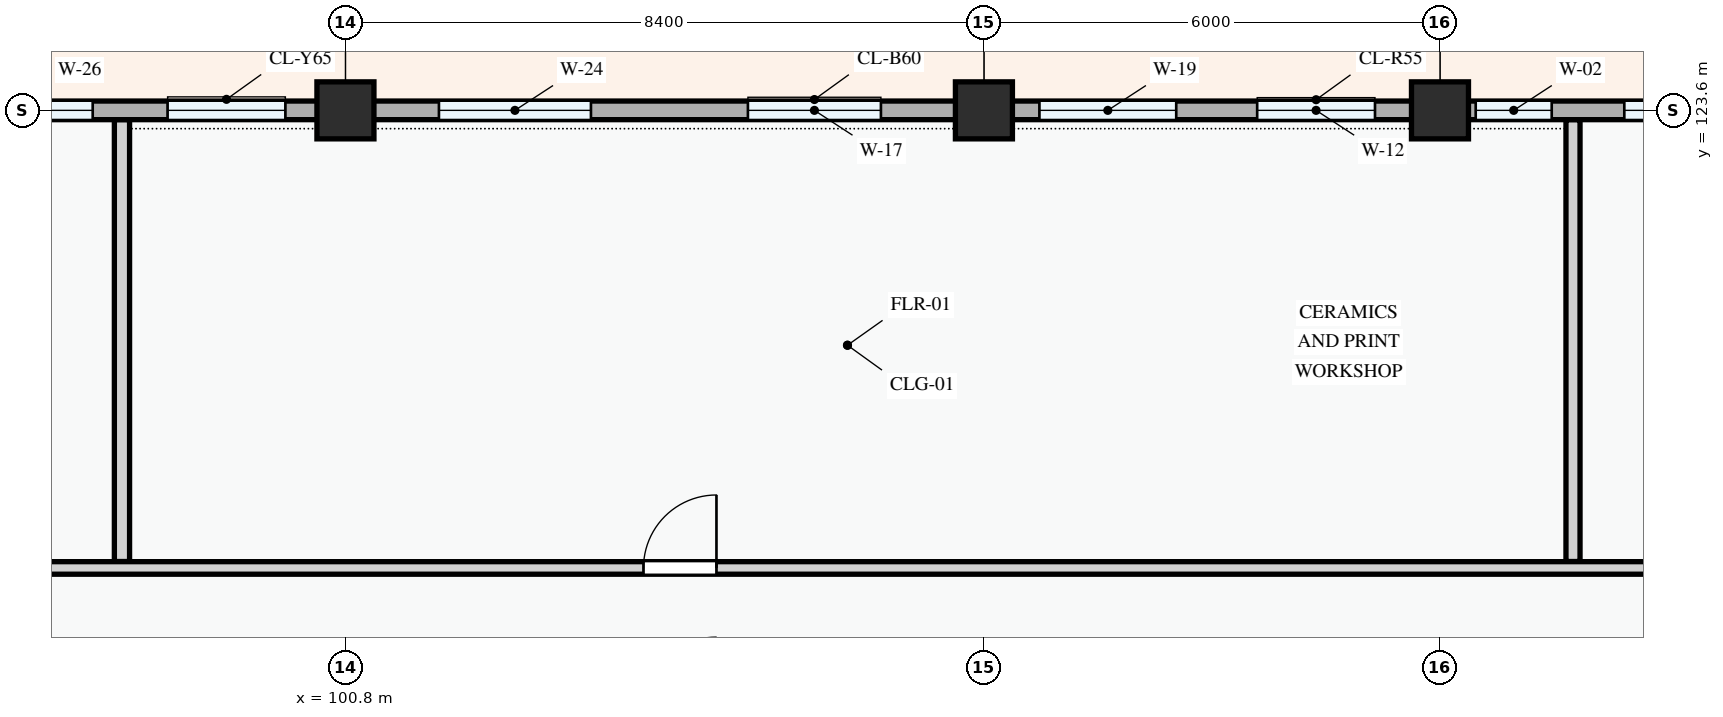
"""IFC4 building model, lengths in metres.
Left out: names, types, materials, properties, quantities, classifications, styles, units other than length and angle.
Written with IfcOpenShell. Run it as: python <this file> out.ifc"""

import sys

from ifc_helpers import new_model, si_unit, direction, frame, frame_2d, origin, origin_2d, place, context, subcontext, project, spatial, rectangle, extrude, element, fill, save


model = new_model("IFC4")
c1 = context("Model", 3, precision=1e-05, world=origin(), true_north=direction((0.0, 1.0)))
c2 = subcontext(c1, "Body", "Model", "MODEL_VIEW")
j1 = project(units=[si_unit("LENGTHUNIT", "METRE"), si_unit("PLANEANGLEUNIT", "RADIAN")], contexts=[c1])
p1 = place(None, origin())
s1 = spatial("IfcSite", under=j1, at=p1, CompositionType="ELEMENT")
p2 = place(p1, origin())
s2 = spatial("IfcBuilding", under=s1, at=p2, CompositionType="ELEMENT")
p3 = place(p2, frame((0.0, 0.0, 4.5)))
s3 = spatial("IfcBuildingStorey", under=s2, at=p3, CompositionType="ELEMENT", Elevation=4.5)
for number, where, z_axis, x_axis in (
    (1, (100.8, 123.6, 0.0), (0.0, 0.0, 1.0), (1.0, 0.0, 0.0)),
    (2, (109.2, 123.6, 0.0), (0.0, 0.0, 1.0), (1.0, 0.0, 0.0)),
    (3, (115.2, 123.6, 0.0), (0.0, 0.0, 1.0), (1.0, 0.0, 0.0)),
):
    element("IfcColumn", number, at=place(p3, frame(where, z_axis=z_axis, x_axis=x_axis)), inside=s3, PredefinedType="COLUMN", context=c2, shape_type="SweptSolid", body=[
        extrude(rectangle(XDim=0.75, YDim=0.75, at=origin_2d()), origin(), (0.0, 0.0, 1.0), 3.6),
    ])
p4 = place(p3, frame((123.6, 123.6, 0.0), z_axis=(0.0, 0.0, 1.0), x_axis=(-1.0, 0.0, 0.0)))
e4 = element("IfcWall", 4, at=p4, inside=s3, PredefinedType="STANDARD", context=c2, shape_type="SweptSolid", body=[
    extrude(rectangle(XDim=8.4, YDim=0.245, at=frame_2d((4.2, 0.0))), origin(), (0.0, 0.0, 1.0), 2.675),
])
p5 = place(p4, frame((1.015, 0.0, 0.78)))
e5 = element("IfcOpeningElement", 5, at=p5, cuts=e4, PredefinedType="OPENING", context=c2, shape_type="SweptSolid", body=[
    extrude(rectangle(XDim=1.65, YDim=1.5, at=frame_2d((0.825, 0.75))), frame((0.0, 0.133, 0.0), z_axis=(0.0, -1.0, 0.0), x_axis=(1.0, 0.0, 0.0)), (0.0, 0.0, 1.0), 0.265),
])
p6 = place(p4, frame((4.025, 0.0, 0.78)))
e6 = element("IfcOpeningElement", 6, at=p6, cuts=e4, PredefinedType="OPENING", context=c2, shape_type="SweptSolid", body=[
    extrude(rectangle(XDim=1.95, YDim=1.65, at=frame_2d((0.975, 0.825))), frame((0.0, 0.133, 0.0), z_axis=(0.0, -1.0, 0.0), x_axis=(1.0, 0.0, 0.0)), (0.0, 0.0, 1.0), 0.265),
])
p7 = place(p4, frame((6.93, 0.0, 0.78)))
e7 = element("IfcOpeningElement", 7, at=p7, cuts=e4, PredefinedType="OPENING", context=c2, shape_type="SweptSolid", body=[
    extrude(rectangle(XDim=1.0, YDim=1.25, at=frame_2d((0.5, 0.625))), frame((0.0, 0.133, 0.0), z_axis=(0.0, -1.0, 0.0), x_axis=(1.0, 0.0, 0.0)), (0.0, 0.0, 1.0), 0.265),
])
p8 = place(p3, frame((115.2, 123.6, 0.0), z_axis=(0.0, 0.0, 1.0), x_axis=(-1.0, 0.0, 0.0)))
e8 = element("IfcWall", 8, at=p8, inside=s3, PredefinedType="STANDARD", context=c2, shape_type="SweptSolid", body=[
    extrude(rectangle(XDim=6.0, YDim=0.245, at=frame_2d((3.0, 0.0))), origin(), (0.0, 0.0, 1.0), 2.775),
])
p9 = place(p8, frame((0.855, 0.0, 0.78)))
e9 = element("IfcOpeningElement", 9, at=p9, cuts=e8, PredefinedType="OPENING", context=c2, shape_type="SweptSolid", body=[
    extrude(rectangle(XDim=1.55, YDim=1.4, at=frame_2d((0.775, 0.7))), frame((0.0, 0.133, 0.0), z_axis=(0.0, -1.0, 0.0), x_axis=(1.0, 0.0, 0.0)), (0.0, 0.0, 1.0), 0.265),
])
p10 = place(p8, frame((3.47, 0.0, 0.78)))
e10 = element("IfcOpeningElement", 10, at=p10, cuts=e8, PredefinedType="OPENING", context=c2, shape_type="SweptSolid", body=[
    extrude(rectangle(XDim=1.8, YDim=1.7, at=frame_2d((0.9, 0.85))), frame((0.0, 0.133, 0.0), z_axis=(0.0, -1.0, 0.0), x_axis=(1.0, 0.0, 0.0)), (0.0, 0.0, 1.0), 0.265),
])
p11 = place(p3, frame((109.2, 123.6, 0.0), z_axis=(0.0, 0.0, 1.0), x_axis=(-1.0, 0.0, 0.0)))
e11 = element("IfcWall", 11, at=p11, inside=s3, PredefinedType="STANDARD", context=c2, shape_type="SweptSolid", body=[
    extrude(rectangle(XDim=8.4, YDim=0.245, at=frame_2d((4.2, 0.0))), origin(), (0.0, 0.0, 1.0), 2.675),
])
p12 = place(p11, frame((1.355, 0.0, 0.78)))
e12 = element("IfcOpeningElement", 12, at=p12, cuts=e11, PredefinedType="OPENING", context=c2, shape_type="SweptSolid", body=[
    extrude(rectangle(XDim=1.75, YDim=1.45, at=frame_2d((0.875, 0.725))), frame((0.0, 0.133, 0.0), z_axis=(0.0, -1.0, 0.0), x_axis=(1.0, 0.0, 0.0)), (0.0, 0.0, 1.0), 0.265),
])
p13 = place(p11, frame((5.17, 0.0, 0.78)))
e13 = element("IfcOpeningElement", 13, at=p13, cuts=e11, PredefinedType="OPENING", context=c2, shape_type="SweptSolid", body=[
    extrude(rectangle(XDim=2.0, YDim=1.75, at=frame_2d((1.0, 0.875))), frame((0.0, 0.133, 0.0), z_axis=(0.0, -1.0, 0.0), x_axis=(1.0, 0.0, 0.0)), (0.0, 0.0, 1.0), 0.265),
])
p14 = place(p3, frame((100.8, 123.6, 0.0), z_axis=(0.0, 0.0, 1.0), x_axis=(-1.0, 0.0, 0.0)))
e14 = element("IfcWall", 14, at=p14, inside=s3, PredefinedType="STANDARD", context=c2, shape_type="SweptSolid", body=[
    extrude(rectangle(XDim=6.0, YDim=0.245, at=frame_2d((3.0, 0.0))), origin(), (0.0, 0.0, 1.0), 2.775),
])
p15 = place(p14, frame((0.79, 0.0, 0.78)))
e15 = element("IfcOpeningElement", 15, at=p15, cuts=e14, PredefinedType="OPENING", context=c2, shape_type="SweptSolid", body=[
    extrude(rectangle(XDim=1.55, YDim=1.4, at=frame_2d((0.775, 0.7))), frame((0.0, 0.133, 0.0), z_axis=(0.0, -1.0, 0.0), x_axis=(1.0, 0.0, 0.0)), (0.0, 0.0, 1.0), 0.265),
])
p16 = place(p14, frame((3.325, 0.0, 0.78)))
e16 = element("IfcOpeningElement", 16, at=p16, cuts=e14, PredefinedType="OPENING", context=c2, shape_type="SweptSolid", body=[
    extrude(rectangle(XDim=2.1, YDim=1.55, at=frame_2d((1.05, 0.775))), frame((0.0, 0.133, 0.0), z_axis=(0.0, -1.0, 0.0), x_axis=(1.0, 0.0, 0.0)), (0.0, 0.0, 1.0), 0.265),
])
p17 = place(p3, frame((97.86, 117.665, 0.0), z_axis=(0.0, 0.0, 1.0), x_axis=(0.0, 1.0, 0.0)))
e17 = element("IfcWall", 17, at=p17, inside=s3, PredefinedType="PARTITIONING", context=c2, shape_type="SweptSolid", body=[
    extrude(rectangle(XDim=5.811, YDim=0.2, at=frame_2d((2.906, 0.0))), origin(), (0.0, 0.0, 1.0), 3.3),
])
p18 = place(p3, frame((116.95, 117.665, 0.0), z_axis=(0.0, 0.0, 1.0), x_axis=(0.0, 1.0, 0.0)))
e18 = element("IfcWall", 18, at=p18, inside=s3, PredefinedType="PARTITIONING", context=c2, shape_type="SweptSolid", body=[
    extrude(rectangle(XDim=5.811, YDim=0.185, at=frame_2d((2.906, 0.0))), origin(), (0.0, 0.0, 1.0), 3.3),
])
p19 = place(p3, frame((80.524, 117.58, 0.0), z_axis=(0.0, 0.0, 1.0), x_axis=(1.0, 0.0, 0.0)))
e19 = element("IfcWall", 19, at=p19, inside=s3, PredefinedType="PARTITIONING", context=c2, shape_type="SweptSolid", body=[
    extrude(rectangle(XDim=72.016, YDim=0.165, at=frame_2d((36.008, 0.0))), origin(), (0.0, 0.0, 1.0), 3.3),
])
p20 = place(p19, frame((9.65, 0.0, 0.0)))
e20 = element("IfcOpeningElement", 20, at=p20, cuts=e19, PredefinedType="OPENING", context=c2, shape_type="SweptSolid", body=[
    extrude(rectangle(XDim=0.92, YDim=2.1, at=frame_2d((0.46, 1.05))), frame((0.0, 0.093, 0.0), z_axis=(0.0, -1.0, 0.0), x_axis=(1.0, 0.0, 0.0)), (0.0, 0.0, 1.0), 0.185),
])
p21 = place(p19, frame((24.197, 0.0, 0.0)))
e21 = element("IfcOpeningElement", 21, at=p21, cuts=e19, PredefinedType="OPENING", context=c2, shape_type="SweptSolid", body=[
    extrude(rectangle(XDim=0.96, YDim=2.12, at=frame_2d((0.48, 1.06))), frame((0.0, 0.093, 0.0), z_axis=(0.0, -1.0, 0.0), x_axis=(1.0, 0.0, 0.0)), (0.0, 0.0, 1.0), 0.185),
])
p22 = place(p19, frame((38.206, 0.0, 0.0)))
e22 = element("IfcOpeningElement", 22, at=p22, cuts=e19, PredefinedType="OPENING", context=c2, shape_type="SweptSolid", body=[
    extrude(rectangle(XDim=0.92, YDim=2.1, at=frame_2d((0.46, 1.05))), frame((0.0, 0.093, 0.0), z_axis=(0.0, -1.0, 0.0), x_axis=(1.0, 0.0, 0.0)), (0.0, 0.0, 1.0), 0.185),
])
p23 = place(p19, frame((67.017, 0.0, 0.0)))
e23 = element("IfcOpeningElement", 23, at=p23, cuts=e19, PredefinedType="OPENING", context=c2, shape_type="SweptSolid", body=[
    extrude(rectangle(XDim=0.92, YDim=2.1, at=frame_2d((0.46, 1.05))), frame((0.0, 0.093, 0.0), z_axis=(0.0, -1.0, 0.0), x_axis=(1.0, 0.0, 0.0)), (0.0, 0.0, 1.0), 0.185),
])
p24 = place(p6, origin())
e24 = element("IfcWindow", 24, at=p24, inside=s3, PartitioningType="DOUBLE_PANEL_VERTICAL", PredefinedType="WINDOW", context=c2, shape_type="SweptSolid", body=[
    extrude(rectangle(XDim=1.95, YDim=1.65, at=frame_2d((0.975, 0.825))), frame((0.0, 0.03, 0.0), z_axis=(0.0, -1.0, 0.0), x_axis=(1.0, 0.0, 0.0)), (0.0, 0.0, 1.0), 0.06),
])
fill(e6, e24)
p25 = place(p7, origin())
e25 = element("IfcWindow", 25, at=p25, inside=s3, PartitioningType="SINGLE_PANEL", PredefinedType="WINDOW", context=c2, shape_type="SweptSolid", body=[
    extrude(rectangle(XDim=1.0, YDim=1.25, at=frame_2d((0.5, 0.625))), frame((0.0, 0.03, 0.0), z_axis=(0.0, -1.0, 0.0), x_axis=(1.0, 0.0, 0.0)), (0.0, 0.0, 1.0), 0.06),
])
fill(e7, e25)
p26 = place(p9, origin())
e26 = element("IfcWindow", 26, at=p26, inside=s3, PartitioningType="SINGLE_PANEL", PredefinedType="WINDOW", context=c2, shape_type="SweptSolid", body=[
    extrude(rectangle(XDim=1.55, YDim=1.4, at=frame_2d((0.775, 0.7))), frame((0.0, 0.03, 0.0), z_axis=(0.0, -1.0, 0.0), x_axis=(1.0, 0.0, 0.0)), (0.0, 0.0, 1.0), 0.06),
])
fill(e9, e26)
p27 = place(p10, origin())
e27 = element("IfcWindow", 27, at=p27, inside=s3, PartitioningType="DOUBLE_PANEL_VERTICAL", PredefinedType="WINDOW", context=c2, shape_type="SweptSolid", body=[
    extrude(rectangle(XDim=1.8, YDim=1.7, at=frame_2d((0.9, 0.85))), frame((0.0, 0.03, 0.0), z_axis=(0.0, -1.0, 0.0), x_axis=(1.0, 0.0, 0.0)), (0.0, 0.0, 1.0), 0.06),
])
fill(e10, e27)
p28 = place(p12, origin())
e28 = element("IfcWindow", 28, at=p28, inside=s3, PartitioningType="DOUBLE_PANEL_VERTICAL", PredefinedType="WINDOW", context=c2, shape_type="SweptSolid", body=[
    extrude(rectangle(XDim=1.75, YDim=1.45, at=frame_2d((0.875, 0.725))), frame((0.0, 0.03, 0.0), z_axis=(0.0, -1.0, 0.0), x_axis=(1.0, 0.0, 0.0)), (0.0, 0.0, 1.0), 0.06),
])
fill(e12, e28)
p29 = place(p13, origin())
e29 = element("IfcWindow", 29, at=p29, inside=s3, PartitioningType="DOUBLE_PANEL_VERTICAL", PredefinedType="WINDOW", context=c2, shape_type="SweptSolid", body=[
    extrude(rectangle(XDim=2.0, YDim=1.75, at=frame_2d((1.0, 0.875))), frame((0.0, 0.03, 0.0), z_axis=(0.0, -1.0, 0.0), x_axis=(1.0, 0.0, 0.0)), (0.0, 0.0, 1.0), 0.06),
])
fill(e13, e29)
p30 = place(p15, origin())
e30 = element("IfcWindow", 30, at=p30, inside=s3, PartitioningType="SINGLE_PANEL", PredefinedType="WINDOW", context=c2, shape_type="SweptSolid", body=[
    extrude(rectangle(XDim=1.55, YDim=1.4, at=frame_2d((0.775, 0.7))), frame((0.0, 0.03, 0.0), z_axis=(0.0, -1.0, 0.0), x_axis=(1.0, 0.0, 0.0)), (0.0, 0.0, 1.0), 0.06),
])
fill(e15, e30)
p31 = place(p16, origin())
e31 = element("IfcWindow", 31, at=p31, inside=s3, PartitioningType="DOUBLE_PANEL_VERTICAL", PredefinedType="WINDOW", context=c2, shape_type="SweptSolid", body=[
    extrude(rectangle(XDim=2.1, YDim=1.55, at=frame_2d((1.05, 0.775))), frame((0.0, 0.03, 0.0), z_axis=(0.0, -1.0, 0.0), x_axis=(1.0, 0.0, 0.0)), (0.0, 0.0, 1.0), 0.06),
])
fill(e16, e31)
p32 = place(p21, origin())
e32 = element("IfcDoor", 32, at=p32, inside=s3, OperationType="SINGLE_SWING_RIGHT", PredefinedType="DOOR", context=c2, shape_type="SweptSolid", body=[
    extrude(rectangle(XDim=0.96, YDim=2.12, at=frame_2d((0.48, 1.06))), frame((0.0, 0.025, 0.0), z_axis=(0.0, -1.0, 0.0), x_axis=(1.0, 0.0, 0.0)), (0.0, 0.0, 1.0), 0.05),
])
fill(e21, e32)
save(model, sys.argv[1])
